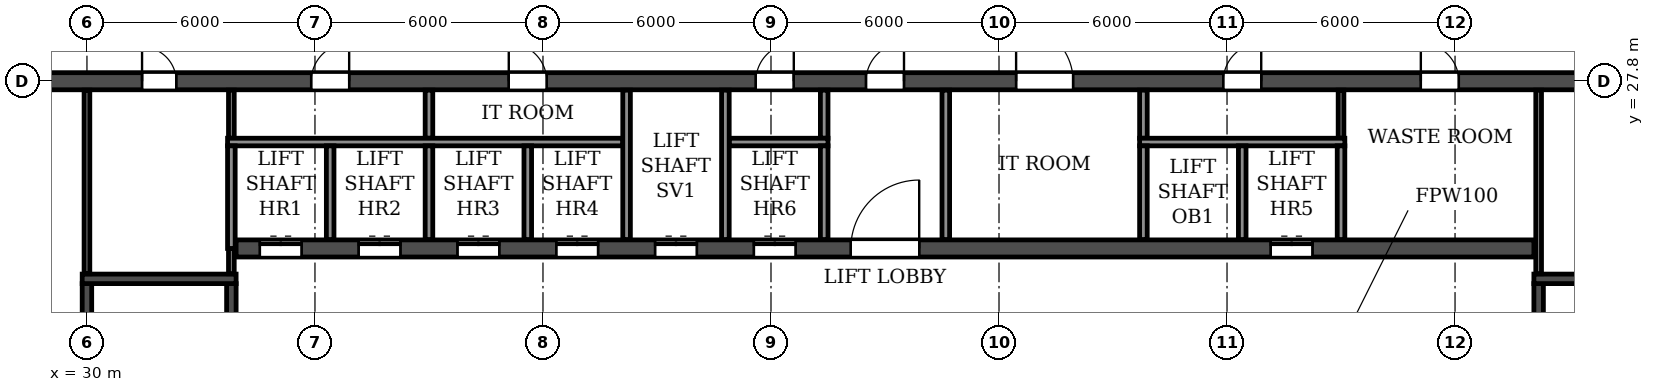
"""IFC4 building model, lengths in metres.
Left out: names, types, materials, properties, quantities, classifications, styles, units other than length and angle.
Written with IfcOpenShell. Run it as: python <this file> out.ifc"""

import sys

from ifc_helpers import new_model, si_unit, direction, frame, frame_2d, origin, place, context, subcontext, project, spatial, rectangle, extrude, element, fill, save


model = new_model("IFC4")
c1 = context("Model", 3, precision=1e-05, world=origin(), true_north=direction((0.0, 1.0)))
c2 = subcontext(c1, "Body", "Model", "MODEL_VIEW")
j1 = project(units=[si_unit("LENGTHUNIT", "METRE"), si_unit("PLANEANGLEUNIT", "RADIAN")], contexts=[c1])
p1 = place(None, origin())
s1 = spatial("IfcSite", under=j1, at=p1, CompositionType="ELEMENT")
p2 = place(p1, origin())
s2 = spatial("IfcBuilding", under=s1, at=p2, CompositionType="ELEMENT")
p3 = place(p2, frame((0.0, 0.0, 162.0)))
s3 = spatial("IfcBuildingStorey", under=s2, at=p3, CompositionType="ELEMENT", Elevation=162.0)
p4 = place(p3, frame((18.2, 27.8, 0.0), z_axis=(0.0, 0.0, 1.0), x_axis=(1.0, 0.0, 0.0)))
e1 = element("IfcWall", 1, at=p4, inside=s3, PredefinedType="SOLIDWALL", context=c2, shape_type="SweptSolid", body=[
    extrude(rectangle(XDim=65.6, YDim=0.45, at=frame_2d((32.8, 0.0))), origin(), (0.0, 0.0, 1.0), 2.95),
])
p5 = place(p4, frame((0.7, 0.0, 0.0)))
e2 = element("IfcOpeningElement", 2, at=p5, cuts=e1, PredefinedType="OPENING", context=c2, shape_type="SweptSolid", body=[
    extrude(rectangle(XDim=1.0, YDim=2.1, at=frame_2d((0.5, 1.05))), frame((0.0, 0.235, 0.0), z_axis=(0.0, -1.0, 0.0), x_axis=(1.0, 0.0, 0.0)), (0.0, 0.0, 1.0), 0.47),
])
p6 = place(p4, frame((4.05, 0.0, 0.0)))
e3 = element("IfcOpeningElement", 3, at=p6, cuts=e1, PredefinedType="OPENING", context=c2, shape_type="SweptSolid", body=[
    extrude(rectangle(XDim=0.9, YDim=2.1, at=frame_2d((0.45, 1.05))), frame((0.0, 0.235, 0.0), z_axis=(0.0, -1.0, 0.0), x_axis=(1.0, 0.0, 0.0)), (0.0, 0.0, 1.0), 0.47),
])
p7 = place(p4, frame((13.25, 0.0, 0.0)))
e4 = element("IfcOpeningElement", 4, at=p7, cuts=e1, PredefinedType="OPENING", context=c2, shape_type="SweptSolid", body=[
    extrude(rectangle(XDim=0.9, YDim=2.1, at=frame_2d((0.45, 1.05))), frame((0.0, 0.235, 0.0), z_axis=(0.0, -1.0, 0.0), x_axis=(1.0, 0.0, 0.0)), (0.0, 0.0, 1.0), 0.47),
])
p8 = place(p4, frame((17.7, 0.0, 0.0)))
e5 = element("IfcOpeningElement", 5, at=p8, cuts=e1, PredefinedType="OPENING", context=c2, shape_type="SweptSolid", body=[
    extrude(rectangle(XDim=1.0, YDim=2.1, at=frame_2d((0.5, 1.05))), frame((0.0, 0.235, 0.0), z_axis=(0.0, -1.0, 0.0), x_axis=(1.0, 0.0, 0.0)), (0.0, 0.0, 1.0), 0.47),
])
p9 = place(p4, frame((22.9, 0.0, 0.0)))
e6 = element("IfcOpeningElement", 6, at=p9, cuts=e1, PredefinedType="OPENING", context=c2, shape_type="SweptSolid", body=[
    extrude(rectangle(XDim=1.0, YDim=2.1, at=frame_2d((0.5, 1.05))), frame((0.0, 0.235, 0.0), z_axis=(0.0, -1.0, 0.0), x_axis=(1.0, 0.0, 0.0)), (0.0, 0.0, 1.0), 0.47),
])
p10 = place(p4, frame((29.4, 0.0, 0.0)))
e7 = element("IfcOpeningElement", 7, at=p10, cuts=e1, PredefinedType="OPENING", context=c2, shape_type="SweptSolid", body=[
    extrude(rectangle(XDim=1.0, YDim=2.1, at=frame_2d((0.5, 1.05))), frame((0.0, 0.235, 0.0), z_axis=(0.0, -1.0, 0.0), x_axis=(1.0, 0.0, 0.0)), (0.0, 0.0, 1.0), 0.47),
])
p11 = place(p4, frame((32.3, 0.0, 0.0)))
e8 = element("IfcOpeningElement", 8, at=p11, cuts=e1, PredefinedType="OPENING", context=c2, shape_type="SweptSolid", body=[
    extrude(rectangle(XDim=1.0, YDim=2.1, at=frame_2d((0.5, 1.05))), frame((0.0, 0.235, 0.0), z_axis=(0.0, -1.0, 0.0), x_axis=(1.0, 0.0, 0.0)), (0.0, 0.0, 1.0), 0.47),
])
p12 = place(p4, frame((36.25, 0.0, 0.0)))
e9 = element("IfcOpeningElement", 9, at=p12, cuts=e1, PredefinedType="OPENING", context=c2, shape_type="SweptSolid", body=[
    extrude(rectangle(XDim=1.5, YDim=2.1, at=frame_2d((0.75, 1.05))), frame((0.0, 0.235, 0.0), z_axis=(0.0, -1.0, 0.0), x_axis=(1.0, 0.0, 0.0)), (0.0, 0.0, 1.0), 0.47),
])
p13 = place(p4, frame((41.7, 0.0, 0.0)))
e10 = element("IfcOpeningElement", 10, at=p13, cuts=e1, PredefinedType="OPENING", context=c2, shape_type="SweptSolid", body=[
    extrude(rectangle(XDim=1.0, YDim=2.1, at=frame_2d((0.5, 1.05))), frame((0.0, 0.235, 0.0), z_axis=(0.0, -1.0, 0.0), x_axis=(1.0, 0.0, 0.0)), (0.0, 0.0, 1.0), 0.47),
])
p14 = place(p4, frame((46.9, 0.0, 0.0)))
e11 = element("IfcOpeningElement", 11, at=p14, cuts=e1, PredefinedType="OPENING", context=c2, shape_type="SweptSolid", body=[
    extrude(rectangle(XDim=1.0, YDim=2.1, at=frame_2d((0.5, 1.05))), frame((0.0, 0.235, 0.0), z_axis=(0.0, -1.0, 0.0), x_axis=(1.0, 0.0, 0.0)), (0.0, 0.0, 1.0), 0.47),
])
p15 = place(p4, frame((51.45, 0.0, 0.0)))
e12 = element("IfcOpeningElement", 12, at=p15, cuts=e1, PredefinedType="OPENING", context=c2, shape_type="SweptSolid", body=[
    extrude(rectangle(XDim=0.9, YDim=2.1, at=frame_2d((0.45, 1.05))), frame((0.0, 0.235, 0.0), z_axis=(0.0, -1.0, 0.0), x_axis=(1.0, 0.0, 0.0)), (0.0, 0.0, 1.0), 0.47),
])
p16 = place(p4, frame((60.65, 0.0, 0.0)))
e13 = element("IfcOpeningElement", 13, at=p16, cuts=e1, PredefinedType="OPENING", context=c2, shape_type="SweptSolid", body=[
    extrude(rectangle(XDim=0.9, YDim=2.1, at=frame_2d((0.45, 1.05))), frame((0.0, 0.235, 0.0), z_axis=(0.0, -1.0, 0.0), x_axis=(1.0, 0.0, 0.0)), (0.0, 0.0, 1.0), 0.47),
])
p17 = place(p4, frame((63.9, 0.0, 0.0)))
e14 = element("IfcOpeningElement", 14, at=p17, cuts=e1, PredefinedType="OPENING", context=c2, shape_type="SweptSolid", body=[
    extrude(rectangle(XDim=1.0, YDim=2.1, at=frame_2d((0.5, 1.05))), frame((0.0, 0.235, 0.0), z_axis=(0.0, -1.0, 0.0), x_axis=(1.0, 0.0, 0.0)), (0.0, 0.0, 1.0), 0.47),
])
p18 = place(p3, frame((33.925, 23.4, 0.0), z_axis=(0.0, 0.0, 1.0), x_axis=(1.0, 0.0, 0.0)))
e15 = element("IfcWall", 15, at=p18, inside=s3, PredefinedType="SOLIDWALL", context=c2, shape_type="SweptSolid", body=[
    extrude(rectangle(XDim=34.15, YDim=0.45, at=frame_2d((17.075, 0.0))), origin(), (0.0, 0.0, 1.0), 2.95),
])
p19 = place(p18, frame((16.175, 0.0, 0.0)))
e16 = element("IfcOpeningElement", 16, at=p19, cuts=e15, PredefinedType="OPENING", context=c2, shape_type="SweptSolid", body=[
    extrude(rectangle(XDim=1.8, YDim=2.1, at=frame_2d((0.9, 1.05))), frame((0.0, 0.235, 0.0), z_axis=(0.0, -1.0, 0.0), x_axis=(1.0, 0.0, 0.0)), (0.0, 0.0, 1.0), 0.47),
])
p20 = place(p18, frame((0.625, 0.0, 0.0)))
e17 = element("IfcOpeningElement", 17, at=p20, cuts=e15, PredefinedType="OPENING", context=c2, shape_type="SweptSolid", body=[
    extrude(rectangle(XDim=1.1, YDim=2.1, at=frame_2d((0.55, 1.05))), frame((0.0, 0.235, 0.0), z_axis=(0.0, -1.0, 0.0), x_axis=(1.0, 0.0, 0.0)), (0.0, 0.0, 1.0), 0.47),
])
p21 = place(p18, frame((3.225, 0.0, 0.0)))
e18 = element("IfcOpeningElement", 18, at=p21, cuts=e15, PredefinedType="OPENING", context=c2, shape_type="SweptSolid", body=[
    extrude(rectangle(XDim=1.1, YDim=2.1, at=frame_2d((0.55, 1.05))), frame((0.0, 0.235, 0.0), z_axis=(0.0, -1.0, 0.0), x_axis=(1.0, 0.0, 0.0)), (0.0, 0.0, 1.0), 0.47),
])
p22 = place(p18, frame((5.825, 0.0, 0.0)))
e19 = element("IfcOpeningElement", 19, at=p22, cuts=e15, PredefinedType="OPENING", context=c2, shape_type="SweptSolid", body=[
    extrude(rectangle(XDim=1.1, YDim=2.1, at=frame_2d((0.55, 1.05))), frame((0.0, 0.235, 0.0), z_axis=(0.0, -1.0, 0.0), x_axis=(1.0, 0.0, 0.0)), (0.0, 0.0, 1.0), 0.47),
])
p23 = place(p18, frame((8.425, 0.0, 0.0)))
e20 = element("IfcOpeningElement", 20, at=p23, cuts=e15, PredefinedType="OPENING", context=c2, shape_type="SweptSolid", body=[
    extrude(rectangle(XDim=1.1, YDim=2.1, at=frame_2d((0.55, 1.05))), frame((0.0, 0.235, 0.0), z_axis=(0.0, -1.0, 0.0), x_axis=(1.0, 0.0, 0.0)), (0.0, 0.0, 1.0), 0.47),
])
p24 = place(p18, frame((11.025, 0.0, 0.0)))
e21 = element("IfcOpeningElement", 21, at=p24, cuts=e15, PredefinedType="OPENING", context=c2, shape_type="SweptSolid", body=[
    extrude(rectangle(XDim=1.1, YDim=2.1, at=frame_2d((0.55, 1.05))), frame((0.0, 0.235, 0.0), z_axis=(0.0, -1.0, 0.0), x_axis=(1.0, 0.0, 0.0)), (0.0, 0.0, 1.0), 0.47),
])
p25 = place(p18, frame((13.625, 0.0, 0.0)))
e22 = element("IfcOpeningElement", 22, at=p25, cuts=e15, PredefinedType="OPENING", context=c2, shape_type="SweptSolid", body=[
    extrude(rectangle(XDim=1.1, YDim=2.1, at=frame_2d((0.55, 1.05))), frame((0.0, 0.235, 0.0), z_axis=(0.0, -1.0, 0.0), x_axis=(1.0, 0.0, 0.0)), (0.0, 0.0, 1.0), 0.47),
])
p26 = place(p18, frame((27.225, 0.0, 0.0)))
e23 = element("IfcOpeningElement", 23, at=p26, cuts=e15, PredefinedType="OPENING", context=c2, shape_type="SweptSolid", body=[
    extrude(rectangle(XDim=1.1, YDim=2.1, at=frame_2d((0.55, 1.05))), frame((0.0, 0.235, 0.0), z_axis=(0.0, -1.0, 0.0), x_axis=(1.0, 0.0, 0.0)), (0.0, 0.0, 1.0), 0.47),
])
p27 = place(p3, frame((30.0, 14.825, 0.0), z_axis=(0.0, 0.0, 1.0), x_axis=(0.0, 1.0, 0.0)))
e24 = element("IfcWall", 24, at=p27, inside=s3, PredefinedType="SOLIDWALL", context=c2, shape_type="SweptSolid", body=[
    extrude(rectangle(XDim=7.65, YDim=0.25, at=frame_2d((3.825, 0.0))), origin(), (0.0, 0.0, 1.0), 2.95),
])
p28 = place(p3, frame((33.8, 14.825, 0.0), z_axis=(0.0, 0.0, 1.0), x_axis=(0.0, 1.0, 0.0)))
e25 = element("IfcWall", 25, at=p28, inside=s3, PredefinedType="SOLIDWALL", context=c2, shape_type="SweptSolid", body=[
    extrude(rectangle(XDim=7.65, YDim=0.25, at=frame_2d((3.825, 0.0))), origin(), (0.0, 0.0, 1.0), 2.95),
])
p29 = place(p28, frame((0.475, 0.0, 0.0)))
e26 = element("IfcOpeningElement", 26, at=p29, cuts=e25, PredefinedType="OPENING", context=c2, shape_type="SweptSolid", body=[
    extrude(rectangle(XDim=1.0, YDim=2.1, at=frame_2d((0.5, 1.05))), frame((0.0, 0.135, 0.0), z_axis=(0.0, -1.0, 0.0), x_axis=(1.0, 0.0, 0.0)), (0.0, 0.0, 1.0), 0.27),
])
p30 = place(p3, frame((29.875, 22.6, 0.0), z_axis=(0.0, 0.0, 1.0), x_axis=(1.0, 0.0, 0.0)))
e27 = element("IfcWall", 27, at=p30, inside=s3, PredefinedType="SOLIDWALL", context=c2, shape_type="SweptSolid", body=[
    extrude(rectangle(XDim=4.05, YDim=0.25, at=frame_2d((2.025, 0.0))), origin(), (0.0, 0.0, 1.0), 2.95),
])
p31 = place(p3, frame((68.2, 14.825, 0.0), z_axis=(0.0, 0.0, 1.0), x_axis=(0.0, 1.0, 0.0)))
e28 = element("IfcWall", 28, at=p31, inside=s3, PredefinedType="SOLIDWALL", context=c2, shape_type="SweptSolid", body=[
    extrude(rectangle(XDim=7.65, YDim=0.25, at=frame_2d((3.825, 0.0))), origin(), (0.0, 0.0, 1.0), 2.95),
])
p32 = place(p31, frame((0.475, 0.0, 0.0)))
e29 = element("IfcOpeningElement", 29, at=p32, cuts=e28, PredefinedType="OPENING", context=c2, shape_type="SweptSolid", body=[
    extrude(rectangle(XDim=1.0, YDim=2.1, at=frame_2d((0.5, 1.05))), frame((0.0, 0.135, 0.0), z_axis=(0.0, -1.0, 0.0), x_axis=(1.0, 0.0, 0.0)), (0.0, 0.0, 1.0), 0.27),
])
p33 = place(p3, frame((68.075, 22.6, 0.0), z_axis=(0.0, 0.0, 1.0), x_axis=(1.0, 0.0, 0.0)))
e30 = element("IfcWall", 30, at=p33, inside=s3, PredefinedType="SOLIDWALL", context=c2, shape_type="SweptSolid", body=[
    extrude(rectangle(XDim=4.05, YDim=0.25, at=frame_2d((2.025, 0.0))), origin(), (0.0, 0.0, 1.0), 2.95),
])
p34 = place(p3, frame((63.0, 26.3, 0.0), z_axis=(0.0, 0.0, 1.0), x_axis=(0.0, 1.0, 0.0)))
e31 = element("IfcWall", 31, at=p34, inside=s3, PredefinedType="PARTITIONING", context=c2, shape_type="SweptSolid", body=[
    extrude(rectangle(XDim=1.265, YDim=0.15, at=frame_2d((0.632, 0.0))), origin(), (0.0, 0.0, 1.0), 2.95),
])
for number, where, z_axis, x_axis in (
    (32, (39.0, 26.3, 0.0), (0.0, 0.0, 1.0), (0.0, 1.0, 0.0)),
    (33, (49.4, 26.3, 0.0), (0.0, 0.0, 1.0), (0.0, 1.0, 0.0)),
):
    element("IfcWall", number, at=place(p3, frame(where, z_axis=z_axis, x_axis=x_axis)), inside=s3, PredefinedType="PARTITIONING", context=c2, shape_type="SweptSolid", body=[
        extrude(rectangle(XDim=1.265, YDim=0.2, at=frame_2d((0.632, 0.0))), origin(), (0.0, 0.0, 1.0), 2.95),
    ])
p35 = place(p3, frame((52.6, 23.635, 0.0), z_axis=(0.0, 0.0, 1.0), x_axis=(0.0, 1.0, 0.0)))
e34 = element("IfcWall", 34, at=p35, inside=s3, PredefinedType="PARTITIONING", context=c2, shape_type="SweptSolid", body=[
    extrude(rectangle(XDim=3.93, YDim=0.2, at=frame_2d((1.965, 0.0))), origin(), (0.0, 0.0, 1.0), 2.95),
])
p36 = place(p3, frame((57.8, 26.3, 0.0), z_axis=(0.0, 0.0, 1.0), x_axis=(0.0, 1.0, 0.0)))
e35 = element("IfcWall", 35, at=p36, inside=s3, PredefinedType="PARTITIONING", context=c2, shape_type="SweptSolid", body=[
    extrude(rectangle(XDim=1.265, YDim=0.2, at=frame_2d((0.632, 0.0))), origin(), (0.0, 0.0, 1.0), 2.95),
])
p37 = place(p3, frame((30.0, 22.735, 0.0), z_axis=(0.0, 0.0, 1.0), x_axis=(0.0, 1.0, 0.0)))
e36 = element("IfcWall", 36, at=p37, inside=s3, PredefinedType="PARTITIONING", context=c2, shape_type="SweptSolid", body=[
    extrude(rectangle(XDim=4.83, YDim=0.15, at=frame_2d((2.415, 0.0))), origin(), (0.0, 0.0, 1.0), 2.95),
])
p38 = place(p3, frame((33.8, 22.735, 0.0), z_axis=(0.0, 0.0, 1.0), x_axis=(0.0, 1.0, 0.0)))
e37 = element("IfcWall", 37, at=p38, inside=s3, PredefinedType="PARTITIONING", context=c2, shape_type="SweptSolid", body=[
    extrude(rectangle(XDim=0.665, YDim=0.15, at=frame_2d((0.333, 0.0))), origin(), (0.0, 0.0, 1.0), 2.95),
])
p39 = place(p3, frame((33.8, 26.3, 0.0), z_axis=(0.0, 0.0, 1.0), x_axis=(0.0, 1.0, 0.0)))
e38 = element("IfcWall", 38, at=p39, inside=s3, PredefinedType="PARTITIONING", context=c2, shape_type="SweptSolid", body=[
    extrude(rectangle(XDim=1.265, YDim=0.15, at=frame_2d((0.632, 0.0))), origin(), (0.0, 0.0, 1.0), 2.95),
])
p40 = place(p3, frame((68.2, 22.735, 0.0), z_axis=(0.0, 0.0, 1.0), x_axis=(0.0, 1.0, 0.0)))
e39 = element("IfcWall", 39, at=p40, inside=s3, PredefinedType="PARTITIONING", context=c2, shape_type="SweptSolid", body=[
    extrude(rectangle(XDim=4.83, YDim=0.15, at=frame_2d((2.415, 0.0))), origin(), (0.0, 0.0, 1.0), 2.95),
])
p41 = place(p3, frame((33.7, 26.2, 0.0), z_axis=(0.0, 0.0, 1.0), x_axis=(1.0, 0.0, 0.0)))
e40 = element("IfcWall", 40, at=p41, inside=s3, PredefinedType="PARTITIONING", context=c2, shape_type="SweptSolid", body=[
    extrude(rectangle(XDim=10.4, YDim=0.2, at=frame_2d((5.2, 0.0))), origin(), (0.0, 0.0, 1.0), 2.95),
])
p42 = place(p3, frame((46.9, 26.2, 0.0), z_axis=(0.0, 0.0, 1.0), x_axis=(1.0, 0.0, 0.0)))
e41 = element("IfcWall", 41, at=p42, inside=s3, PredefinedType="PARTITIONING", context=c2, shape_type="SweptSolid", body=[
    extrude(rectangle(XDim=2.6, YDim=0.2, at=frame_2d((1.3, 0.0))), origin(), (0.0, 0.0, 1.0), 2.95),
])
p43 = place(p3, frame((57.7, 26.2, 0.0), z_axis=(0.0, 0.0, 1.0), x_axis=(1.0, 0.0, 0.0)))
e42 = element("IfcWall", 42, at=p43, inside=s3, PredefinedType="PARTITIONING", context=c2, shape_type="SweptSolid", body=[
    extrude(rectangle(XDim=5.4, YDim=0.2, at=frame_2d((2.7, 0.0))), origin(), (0.0, 0.0, 1.0), 2.95),
])
p44 = place(p3, frame((33.8, 23.4, 0.0), z_axis=(0.0, 0.0, 1.0), x_axis=(0.0, 1.0, 0.0)))
e43 = element("IfcWall", 43, at=p44, inside=s3, PredefinedType="PARTITIONING", context=c2, shape_type="SweptSolid", body=[
    extrude(rectangle(XDim=2.7, YDim=0.2, at=frame_2d((1.35, 0.0))), origin(), (0.0, 0.0, 1.0), 2.95),
])
for number, where, z_axis, x_axis in (
    (44, (36.4, 23.635, 0.0), (0.0, 0.0, 1.0), (0.0, 1.0, 0.0)),
    (45, (39.0, 23.635, 0.0), (0.0, 0.0, 1.0), (0.0, 1.0, 0.0)),
    (46, (41.6, 23.635, 0.0), (0.0, 0.0, 1.0), (0.0, 1.0, 0.0)),
):
    element("IfcWall", number, at=place(p3, frame(where, z_axis=z_axis, x_axis=x_axis)), inside=s3, PredefinedType="PARTITIONING", context=c2, shape_type="SweptSolid", body=[
        extrude(rectangle(XDim=2.465, YDim=0.2, at=frame_2d((1.232, 0.0))), origin(), (0.0, 0.0, 1.0), 2.95),
    ])
for number, where, z_axis, x_axis in (
    (47, (44.2, 23.635, 0.0), (0.0, 0.0, 1.0), (0.0, 1.0, 0.0)),
    (48, (46.8, 23.635, 0.0), (0.0, 0.0, 1.0), (0.0, 1.0, 0.0)),
):
    element("IfcWall", number, at=place(p3, frame(where, z_axis=z_axis, x_axis=x_axis)), inside=s3, PredefinedType="PARTITIONING", context=c2, shape_type="SweptSolid", body=[
        extrude(rectangle(XDim=3.93, YDim=0.2, at=frame_2d((1.965, 0.0))), origin(), (0.0, 0.0, 1.0), 2.95),
    ])
for number, where, z_axis, x_axis in (
    (49, (49.4, 23.635, 0.0), (0.0, 0.0, 1.0), (0.0, 1.0, 0.0)),
    (50, (57.8, 23.635, 0.0), (0.0, 0.0, 1.0), (0.0, 1.0, 0.0)),
    (51, (60.4, 23.635, 0.0), (0.0, 0.0, 1.0), (0.0, 1.0, 0.0)),
    (52, (63.0, 23.635, 0.0), (0.0, 0.0, 1.0), (0.0, 1.0, 0.0)),
):
    element("IfcWall", number, at=place(p3, frame(where, z_axis=z_axis, x_axis=x_axis)), inside=s3, PredefinedType="PARTITIONING", context=c2, shape_type="SweptSolid", body=[
        extrude(rectangle(XDim=2.465, YDim=0.2, at=frame_2d((1.232, 0.0))), origin(), (0.0, 0.0, 1.0), 2.95),
    ])
p45 = place(p7, origin())
e53 = element("IfcDoor", 53, at=p45, inside=s3, OperationType="SINGLE_SWING_LEFT", PredefinedType="DOOR", context=c2, shape_type="SweptSolid", body=[
    extrude(rectangle(XDim=0.9, YDim=2.1, at=frame_2d((0.45, 1.05))), frame((0.0, 0.025, 0.0), z_axis=(0.0, -1.0, 0.0), x_axis=(1.0, 0.0, 0.0)), (0.0, 0.0, 1.0), 0.05),
])
fill(e4, e53)
p46 = place(p8, origin())
e54 = element("IfcDoor", 54, at=p46, inside=s3, OperationType="SINGLE_SWING_RIGHT", PredefinedType="DOOR", context=c2, shape_type="SweptSolid", body=[
    extrude(rectangle(XDim=1.0, YDim=2.1, at=frame_2d((0.5, 1.05))), frame((0.0, 0.025, 0.0), z_axis=(0.0, -1.0, 0.0), x_axis=(1.0, 0.0, 0.0)), (0.0, 0.0, 1.0), 0.05),
])
fill(e5, e54)
p47 = place(p9, origin())
e55 = element("IfcDoor", 55, at=p47, inside=s3, OperationType="SINGLE_SWING_LEFT", PredefinedType="DOOR", context=c2, shape_type="SweptSolid", body=[
    extrude(rectangle(XDim=1.0, YDim=2.1, at=frame_2d((0.5, 1.05))), frame((0.0, 0.025, 0.0), z_axis=(0.0, -1.0, 0.0), x_axis=(1.0, 0.0, 0.0)), (0.0, 0.0, 1.0), 0.05),
])
fill(e6, e55)
p48 = place(p10, origin())
e56 = element("IfcDoor", 56, at=p48, inside=s3, OperationType="SINGLE_SWING_RIGHT", PredefinedType="DOOR", context=c2, shape_type="SweptSolid", body=[
    extrude(rectangle(XDim=1.0, YDim=2.1, at=frame_2d((0.5, 1.05))), frame((0.0, 0.025, 0.0), z_axis=(0.0, -1.0, 0.0), x_axis=(1.0, 0.0, 0.0)), (0.0, 0.0, 1.0), 0.05),
])
fill(e7, e56)
p49 = place(p11, origin())
e57 = element("IfcDoor", 57, at=p49, inside=s3, OperationType="SINGLE_SWING_RIGHT", PredefinedType="DOOR", context=c2, shape_type="SweptSolid", body=[
    extrude(rectangle(XDim=1.0, YDim=2.1, at=frame_2d((0.5, 1.05))), frame((0.0, 0.025, 0.0), z_axis=(0.0, -1.0, 0.0), x_axis=(1.0, 0.0, 0.0)), (0.0, 0.0, 1.0), 0.05),
])
fill(e8, e57)
p50 = place(p12, origin())
e58 = element("IfcDoor", 58, at=p50, inside=s3, OperationType="DOUBLE_DOOR_SINGLE_SWING", PredefinedType="DOOR", context=c2, shape_type="SweptSolid", body=[
    extrude(rectangle(XDim=1.5, YDim=2.1, at=frame_2d((0.75, 1.05))), frame((0.0, 0.025, 0.0), z_axis=(0.0, -1.0, 0.0), x_axis=(1.0, 0.0, 0.0)), (0.0, 0.0, 1.0), 0.05),
])
fill(e9, e58)
p51 = place(p13, origin())
e59 = element("IfcDoor", 59, at=p51, inside=s3, OperationType="SINGLE_SWING_RIGHT", PredefinedType="DOOR", context=c2, shape_type="SweptSolid", body=[
    extrude(rectangle(XDim=1.0, YDim=2.1, at=frame_2d((0.5, 1.05))), frame((0.0, 0.025, 0.0), z_axis=(0.0, -1.0, 0.0), x_axis=(1.0, 0.0, 0.0)), (0.0, 0.0, 1.0), 0.05),
])
fill(e10, e59)
p52 = place(p14, origin())
e60 = element("IfcDoor", 60, at=p52, inside=s3, OperationType="SINGLE_SWING_LEFT", PredefinedType="DOOR", context=c2, shape_type="SweptSolid", body=[
    extrude(rectangle(XDim=1.0, YDim=2.1, at=frame_2d((0.5, 1.05))), frame((0.0, 0.025, 0.0), z_axis=(0.0, -1.0, 0.0), x_axis=(1.0, 0.0, 0.0)), (0.0, 0.0, 1.0), 0.05),
])
fill(e11, e60)
p53 = place(p19, origin())
e61 = element("IfcDoor", 61, at=p53, inside=s3, OperationType="DOUBLE_DOOR_SINGLE_SWING", PredefinedType="DOOR", context=c2, shape_type="SweptSolid", body=[
    extrude(rectangle(XDim=1.8, YDim=2.1, at=frame_2d((0.9, 1.05))), frame((0.0, 0.025, 0.0), z_axis=(0.0, -1.0, 0.0), x_axis=(1.0, 0.0, 0.0)), (0.0, 0.0, 1.0), 0.05),
])
fill(e16, e61)
p54 = place(p20, origin())
e62 = element("IfcDoor", 62, at=p54, inside=s3, OperationType="DOUBLE_DOOR_SLIDING", PredefinedType="DOOR", context=c2, shape_type="SweptSolid", body=[
    extrude(rectangle(XDim=1.1, YDim=2.1, at=frame_2d((0.55, 1.05))), frame((0.0, 0.025, 0.0), z_axis=(0.0, -1.0, 0.0), x_axis=(1.0, 0.0, 0.0)), (0.0, 0.0, 1.0), 0.05),
])
fill(e17, e62)
p55 = place(p21, origin())
e63 = element("IfcDoor", 63, at=p55, inside=s3, OperationType="DOUBLE_DOOR_SLIDING", PredefinedType="DOOR", context=c2, shape_type="SweptSolid", body=[
    extrude(rectangle(XDim=1.1, YDim=2.1, at=frame_2d((0.55, 1.05))), frame((0.0, 0.025, 0.0), z_axis=(0.0, -1.0, 0.0), x_axis=(1.0, 0.0, 0.0)), (0.0, 0.0, 1.0), 0.05),
])
fill(e18, e63)
p56 = place(p22, origin())
e64 = element("IfcDoor", 64, at=p56, inside=s3, OperationType="DOUBLE_DOOR_SLIDING", PredefinedType="DOOR", context=c2, shape_type="SweptSolid", body=[
    extrude(rectangle(XDim=1.1, YDim=2.1, at=frame_2d((0.55, 1.05))), frame((0.0, 0.025, 0.0), z_axis=(0.0, -1.0, 0.0), x_axis=(1.0, 0.0, 0.0)), (0.0, 0.0, 1.0), 0.05),
])
fill(e19, e64)
p57 = place(p23, origin())
e65 = element("IfcDoor", 65, at=p57, inside=s3, OperationType="DOUBLE_DOOR_SLIDING", PredefinedType="DOOR", context=c2, shape_type="SweptSolid", body=[
    extrude(rectangle(XDim=1.1, YDim=2.1, at=frame_2d((0.55, 1.05))), frame((0.0, 0.025, 0.0), z_axis=(0.0, -1.0, 0.0), x_axis=(1.0, 0.0, 0.0)), (0.0, 0.0, 1.0), 0.05),
])
fill(e20, e65)
p58 = place(p24, origin())
e66 = element("IfcDoor", 66, at=p58, inside=s3, OperationType="DOUBLE_DOOR_SLIDING", PredefinedType="DOOR", context=c2, shape_type="SweptSolid", body=[
    extrude(rectangle(XDim=1.1, YDim=2.1, at=frame_2d((0.55, 1.05))), frame((0.0, 0.025, 0.0), z_axis=(0.0, -1.0, 0.0), x_axis=(1.0, 0.0, 0.0)), (0.0, 0.0, 1.0), 0.05),
])
fill(e21, e66)
p59 = place(p25, origin())
e67 = element("IfcDoor", 67, at=p59, inside=s3, OperationType="DOUBLE_DOOR_SLIDING", PredefinedType="DOOR", context=c2, shape_type="SweptSolid", body=[
    extrude(rectangle(XDim=1.1, YDim=2.1, at=frame_2d((0.55, 1.05))), frame((0.0, 0.025, 0.0), z_axis=(0.0, -1.0, 0.0), x_axis=(1.0, 0.0, 0.0)), (0.0, 0.0, 1.0), 0.05),
])
fill(e22, e67)
p60 = place(p26, origin())
e68 = element("IfcDoor", 68, at=p60, inside=s3, OperationType="DOUBLE_DOOR_SLIDING", PredefinedType="DOOR", context=c2, shape_type="SweptSolid", body=[
    extrude(rectangle(XDim=1.1, YDim=2.1, at=frame_2d((0.55, 1.05))), frame((0.0, 0.025, 0.0), z_axis=(0.0, -1.0, 0.0), x_axis=(1.0, 0.0, 0.0)), (0.0, 0.0, 1.0), 0.05),
])
fill(e23, e68)
save(model, sys.argv[1])
